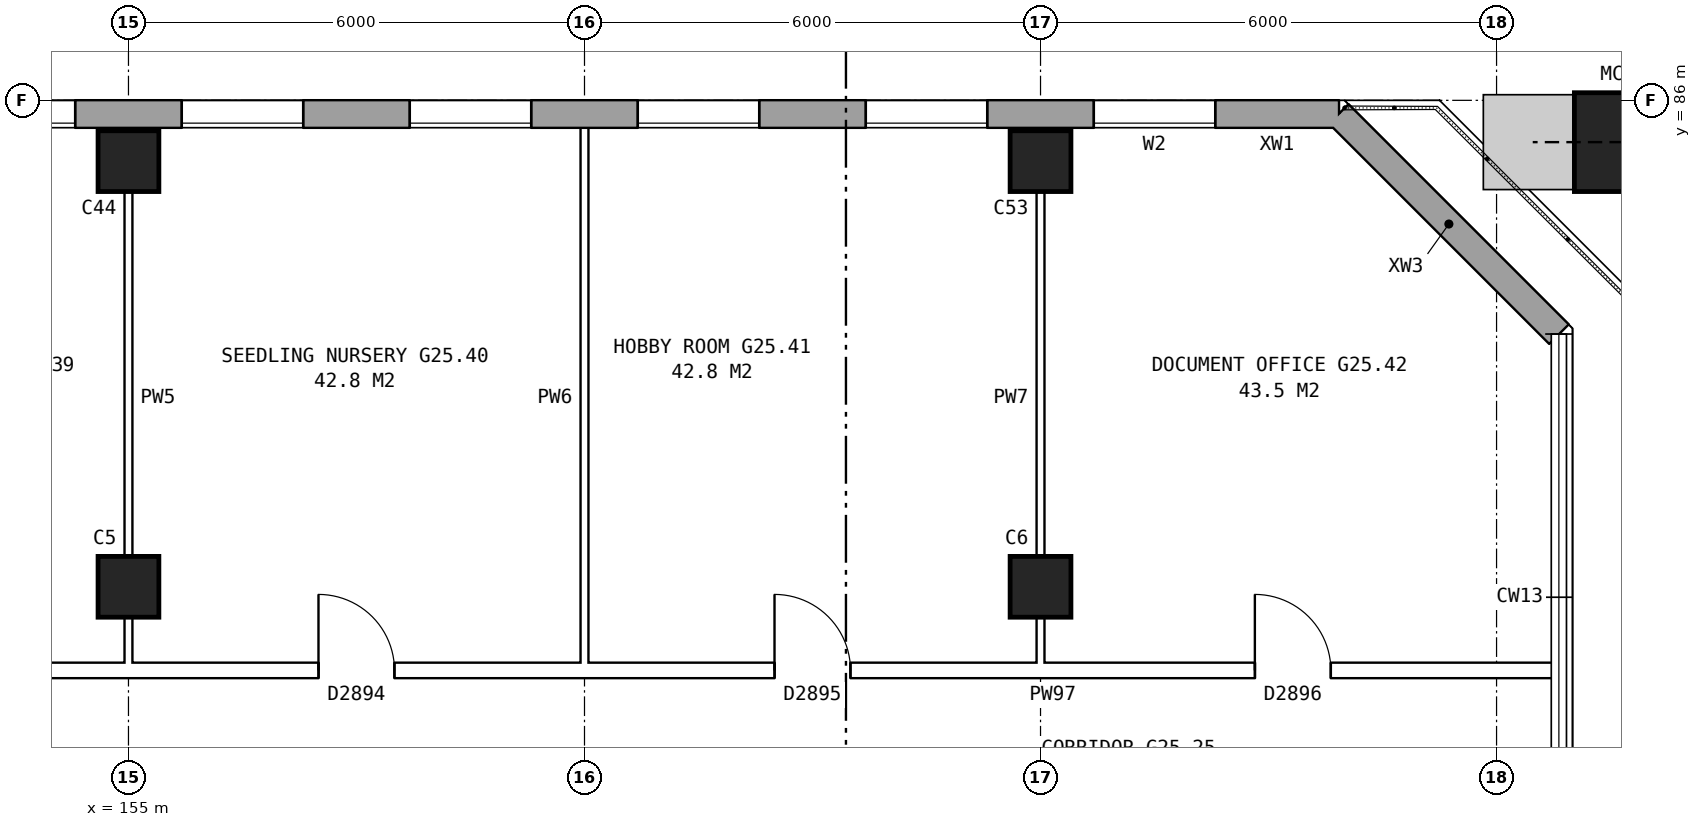
"""IFC4 building model, lengths in metres.
Left out: names, types, materials, properties, quantities, classifications, styles, units other than length and angle.
Written with IfcOpenShell. Run it as: python <this file> out.ifc"""

import sys

from ifc_helpers import new_model, si_unit, direction, frame, frame_2d, origin, origin_2d, place, context, subcontext, project, spatial, rectangle, hollow_rectangle, extrude, element, fill, save


model = new_model("IFC4")
c1 = context("Model", 3, precision=1e-05, world=origin(), true_north=direction((0.0, 1.0)))
c2 = subcontext(c1, "Body", "Model", "MODEL_VIEW")
j1 = project(units=[si_unit("LENGTHUNIT", "METRE"), si_unit("PLANEANGLEUNIT", "RADIAN")], contexts=[c1])
p1 = place(None, origin())
s1 = spatial("IfcSite", under=j1, at=p1, CompositionType="ELEMENT")
p2 = place(p1, origin())
s2 = spatial("IfcBuilding", under=s1, at=p2, CompositionType="ELEMENT")
p3 = place(p2, frame((0.0, 0.0, 90.2)))
s3 = spatial("IfcBuildingStorey", under=s2, at=p3, CompositionType="ELEMENT", Elevation=90.2)
for number, where, z_axis, x_axis in (
    (1, (155.0, 79.6, 0.0), (0.0, 0.0, 1.0), (1.0, 0.0, 0.0)),
    (2, (155.0, 85.2, 0.0), (0.0, 0.0, 1.0), (1.0, 0.0, 0.0)),
    (3, (167.0, 79.6, 0.0), (0.0, 0.0, 1.0), (1.0, 0.0, 0.0)),
    (4, (167.0, 85.2, 0.0), (0.0, 0.0, 1.0), (1.0, 0.0, 0.0)),
):
    element("IfcColumn", number, at=place(p3, frame(where, z_axis=z_axis, x_axis=x_axis)), inside=s3, PredefinedType="COLUMN", context=c2, shape_type="SweptSolid", body=[
        extrude(rectangle(XDim=0.8, YDim=0.8, at=origin_2d()), origin(), (0.0, 0.0, 1.0), 5.6),
    ])
p4 = place(p3, frame((174.674, 85.45, 0.129), z_axis=(-0.197649285048, 0.0, 0.980272798827), x_axis=(0.0, -1.0, 0.0)))
e5 = element("IfcColumn", 5, at=p4, inside=s3, PredefinedType="COLUMN", context=c2, shape_type="SweptSolid", body=[
    extrude(hollow_rectangle(XDim=1.3, YDim=1.3, WallThickness=0.07, at=origin_2d()), origin(), (0.0, 0.0, 1.0), 6.062),
])
p5 = place(p3, frame((173.82, 82.925, 0.0), z_axis=(0.0, 0.0, 1.0), x_axis=(-0.707106781187, 0.707106781187, 0.0)))
e6 = element("IfcWall", 6, at=p5, inside=s3, PredefinedType="STANDARD", context=c2, shape_type="SweptSolid", body=[
    extrude(rectangle(XDim=4.094, YDim=0.36, at=frame_2d((2.047, 0.0))), origin(), (0.0, 0.0, 1.0), 5.6),
])
p6 = place(p3, frame((170.925, 85.82, 0.0), z_axis=(0.0, 0.0, 1.0), x_axis=(-1.0, 0.0, 0.0)))
e7 = element("IfcWall", 7, at=p6, inside=s3, PredefinedType="STANDARD", context=c2, shape_type="SweptSolid", body=[
    extrude(rectangle(XDim=36.851, YDim=0.36, at=frame_2d((18.425, 0.0))), origin(), (0.0, 0.0, 1.0), 5.6),
])
p7 = place(p6, frame((1.625, 0.0, 0.15)))
e8 = element("IfcOpeningElement", 8, at=p7, cuts=e7, PredefinedType="OPENING", context=c2, shape_type="SweptSolid", body=[
    extrude(rectangle(XDim=1.6, YDim=2.4, at=frame_2d((0.8, 1.2))), frame((0.0, 0.19, 0.0), z_axis=(0.0, -1.0, 0.0), x_axis=(1.0, 0.0, 0.0)), (0.0, 0.0, 1.0), 0.38),
])
p8 = place(p6, frame((4.625, 0.0, 0.15)))
e9 = element("IfcOpeningElement", 9, at=p8, cuts=e7, PredefinedType="OPENING", context=c2, shape_type="SweptSolid", body=[
    extrude(rectangle(XDim=1.6, YDim=2.4, at=frame_2d((0.8, 1.2))), frame((0.0, 0.19, 0.0), z_axis=(0.0, -1.0, 0.0), x_axis=(1.0, 0.0, 0.0)), (0.0, 0.0, 1.0), 0.38),
])
p9 = place(p6, frame((7.625, 0.0, 0.15)))
e10 = element("IfcOpeningElement", 10, at=p9, cuts=e7, PredefinedType="OPENING", context=c2, shape_type="SweptSolid", body=[
    extrude(rectangle(XDim=1.6, YDim=2.4, at=frame_2d((0.8, 1.2))), frame((0.0, 0.19, 0.0), z_axis=(0.0, -1.0, 0.0), x_axis=(1.0, 0.0, 0.0)), (0.0, 0.0, 1.0), 0.38),
])
p10 = place(p6, frame((10.625, 0.0, 0.15)))
e11 = element("IfcOpeningElement", 11, at=p10, cuts=e7, PredefinedType="OPENING", context=c2, shape_type="SweptSolid", body=[
    extrude(rectangle(XDim=1.6, YDim=2.4, at=frame_2d((0.8, 1.2))), frame((0.0, 0.19, 0.0), z_axis=(0.0, -1.0, 0.0), x_axis=(1.0, 0.0, 0.0)), (0.0, 0.0, 1.0), 0.38),
])
p11 = place(p6, frame((13.625, 0.0, 0.15)))
e12 = element("IfcOpeningElement", 12, at=p11, cuts=e7, PredefinedType="OPENING", context=c2, shape_type="SweptSolid", body=[
    extrude(rectangle(XDim=1.6, YDim=2.4, at=frame_2d((0.8, 1.2))), frame((0.0, 0.19, 0.0), z_axis=(0.0, -1.0, 0.0), x_axis=(1.0, 0.0, 0.0)), (0.0, 0.0, 1.0), 0.38),
])
p12 = place(p6, frame((16.625, 0.0, 0.15)))
e13 = element("IfcOpeningElement", 13, at=p12, cuts=e7, PredefinedType="OPENING", context=c2, shape_type="SweptSolid", body=[
    extrude(rectangle(XDim=1.6, YDim=2.4, at=frame_2d((0.8, 1.2))), frame((0.0, 0.19, 0.0), z_axis=(0.0, -1.0, 0.0), x_axis=(1.0, 0.0, 0.0)), (0.0, 0.0, 1.0), 0.38),
])
p13 = place(p6, frame((19.625, 0.0, 0.15)))
e14 = element("IfcOpeningElement", 14, at=p13, cuts=e7, PredefinedType="OPENING", context=c2, shape_type="SweptSolid", body=[
    extrude(rectangle(XDim=1.6, YDim=2.4, at=frame_2d((0.8, 1.2))), frame((0.0, 0.19, 0.0), z_axis=(0.0, -1.0, 0.0), x_axis=(1.0, 0.0, 0.0)), (0.0, 0.0, 1.0), 0.38),
])
p14 = place(p6, frame((22.625, 0.0, 0.15)))
e15 = element("IfcOpeningElement", 15, at=p14, cuts=e7, PredefinedType="OPENING", context=c2, shape_type="SweptSolid", body=[
    extrude(rectangle(XDim=1.6, YDim=2.4, at=frame_2d((0.8, 1.2))), frame((0.0, 0.19, 0.0), z_axis=(0.0, -1.0, 0.0), x_axis=(1.0, 0.0, 0.0)), (0.0, 0.0, 1.0), 0.38),
])
p15 = place(p6, frame((25.625, 0.0, 0.15)))
e16 = element("IfcOpeningElement", 16, at=p15, cuts=e7, PredefinedType="OPENING", context=c2, shape_type="SweptSolid", body=[
    extrude(rectangle(XDim=1.6, YDim=2.4, at=frame_2d((0.8, 1.2))), frame((0.0, 0.19, 0.0), z_axis=(0.0, -1.0, 0.0), x_axis=(1.0, 0.0, 0.0)), (0.0, 0.0, 1.0), 0.38),
])
p16 = place(p6, frame((28.625, 0.0, 0.15)))
e17 = element("IfcOpeningElement", 17, at=p16, cuts=e7, PredefinedType="OPENING", context=c2, shape_type="SweptSolid", body=[
    extrude(rectangle(XDim=1.6, YDim=2.4, at=frame_2d((0.8, 1.2))), frame((0.0, 0.19, 0.0), z_axis=(0.0, -1.0, 0.0), x_axis=(1.0, 0.0, 0.0)), (0.0, 0.0, 1.0), 0.38),
])
p17 = place(p6, frame((31.625, 0.0, 0.15)))
e18 = element("IfcOpeningElement", 18, at=p17, cuts=e7, PredefinedType="OPENING", context=c2, shape_type="SweptSolid", body=[
    extrude(rectangle(XDim=1.6, YDim=2.4, at=frame_2d((0.8, 1.2))), frame((0.0, 0.19, 0.0), z_axis=(0.0, -1.0, 0.0), x_axis=(1.0, 0.0, 0.0)), (0.0, 0.0, 1.0), 0.38),
])
p18 = place(p6, frame((34.625, 0.0, 0.15)))
e19 = element("IfcOpeningElement", 19, at=p18, cuts=e7, PredefinedType="OPENING", context=c2, shape_type="SweptSolid", body=[
    extrude(rectangle(XDim=1.6, YDim=2.4, at=frame_2d((0.8, 1.2))), frame((0.0, 0.19, 0.0), z_axis=(0.0, -1.0, 0.0), x_axis=(1.0, 0.0, 0.0)), (0.0, 0.0, 1.0), 0.38),
])
p19 = place(p3, frame((131.24, 78.5, 0.0), z_axis=(0.0, 0.0, 1.0), x_axis=(1.0, 0.0, 0.0)))
e20 = element("IfcWall", 20, at=p19, inside=s3, PredefinedType="PARTITIONING", context=c2, shape_type="SweptSolid", body=[
    extrude(rectangle(XDim=42.52, YDim=0.2, at=frame_2d((21.26, 0.0))), origin(), (0.0, 0.0, 1.0), 5.6),
])
p20 = place(p19, frame((0.99, 0.0, 0.0)))
e21 = element("IfcOpeningElement", 21, at=p20, cuts=e20, PredefinedType="OPENING", context=c2, shape_type="SweptSolid", body=[
    extrude(rectangle(XDim=0.9, YDim=2.1, at=frame_2d((0.45, 1.05))), frame((0.0, 0.11, 0.0), z_axis=(0.0, -1.0, 0.0), x_axis=(1.0, 0.0, 0.0)), (0.0, 0.0, 1.0), 0.22),
])
p21 = place(p19, frame((3.81, 0.0, 0.0)))
e22 = element("IfcOpeningElement", 22, at=p21, cuts=e20, PredefinedType="OPENING", context=c2, shape_type="SweptSolid", body=[
    extrude(rectangle(XDim=0.9, YDim=2.1, at=frame_2d((0.45, 1.05))), frame((0.0, 0.11, 0.0), z_axis=(0.0, -1.0, 0.0), x_axis=(1.0, 0.0, 0.0)), (0.0, 0.0, 1.0), 0.22),
])
p22 = place(p19, frame((6.81, 0.0, 0.0)))
e23 = element("IfcOpeningElement", 23, at=p22, cuts=e20, PredefinedType="OPENING", context=c2, shape_type="SweptSolid", body=[
    extrude(rectangle(XDim=0.9, YDim=2.1, at=frame_2d((0.45, 1.05))), frame((0.0, 0.11, 0.0), z_axis=(0.0, -1.0, 0.0), x_axis=(1.0, 0.0, 0.0)), (0.0, 0.0, 1.0), 0.22),
])
p23 = place(p19, frame((9.81, 0.0, 0.0)))
e24 = element("IfcOpeningElement", 24, at=p23, cuts=e20, PredefinedType="OPENING", context=c2, shape_type="SweptSolid", body=[
    extrude(rectangle(XDim=0.9, YDim=2.1, at=frame_2d((0.45, 1.05))), frame((0.0, 0.11, 0.0), z_axis=(0.0, -1.0, 0.0), x_axis=(1.0, 0.0, 0.0)), (0.0, 0.0, 1.0), 0.22),
])
p24 = place(p19, frame((14.26, 0.0, 0.0)))
e25 = element("IfcOpeningElement", 25, at=p24, cuts=e20, PredefinedType="OPENING", context=c2, shape_type="SweptSolid", body=[
    extrude(rectangle(XDim=1.0, YDim=2.1, at=frame_2d((0.5, 1.05))), frame((0.0, 0.11, 0.0), z_axis=(0.0, -1.0, 0.0), x_axis=(1.0, 0.0, 0.0)), (0.0, 0.0, 1.0), 0.22),
])
p25 = place(p19, frame((20.26, 0.0, 0.0)))
e26 = element("IfcOpeningElement", 26, at=p25, cuts=e20, PredefinedType="OPENING", context=c2, shape_type="SweptSolid", body=[
    extrude(rectangle(XDim=1.0, YDim=2.1, at=frame_2d((0.5, 1.05))), frame((0.0, 0.11, 0.0), z_axis=(0.0, -1.0, 0.0), x_axis=(1.0, 0.0, 0.0)), (0.0, 0.0, 1.0), 0.22),
])
p26 = place(p19, frame((26.26, 0.0, 0.0)))
e27 = element("IfcOpeningElement", 27, at=p26, cuts=e20, PredefinedType="OPENING", context=c2, shape_type="SweptSolid", body=[
    extrude(rectangle(XDim=1.0, YDim=2.1, at=frame_2d((0.5, 1.05))), frame((0.0, 0.11, 0.0), z_axis=(0.0, -1.0, 0.0), x_axis=(1.0, 0.0, 0.0)), (0.0, 0.0, 1.0), 0.22),
])
p27 = place(p19, frame((32.26, 0.0, 0.0)))
e28 = element("IfcOpeningElement", 28, at=p27, cuts=e20, PredefinedType="OPENING", context=c2, shape_type="SweptSolid", body=[
    extrude(rectangle(XDim=1.0, YDim=2.1, at=frame_2d((0.5, 1.05))), frame((0.0, 0.11, 0.0), z_axis=(0.0, -1.0, 0.0), x_axis=(1.0, 0.0, 0.0)), (0.0, 0.0, 1.0), 0.22),
])
p28 = place(p19, frame((38.58, 0.0, 0.0)))
e29 = element("IfcOpeningElement", 29, at=p28, cuts=e20, PredefinedType="OPENING", context=c2, shape_type="SweptSolid", body=[
    extrude(rectangle(XDim=1.0, YDim=2.1, at=frame_2d((0.5, 1.05))), frame((0.0, 0.11, 0.0), z_axis=(0.0, -1.0, 0.0), x_axis=(1.0, 0.0, 0.0)), (0.0, 0.0, 1.0), 0.22),
])
for number, where, z_axis, x_axis in (
    (30, (155.0, 78.4, 0.0), (0.0, 0.0, 1.0), (0.0, 1.0, 0.0)),
    (31, (161.0, 78.4, 0.0), (0.0, 0.0, 1.0), (0.0, 1.0, 0.0)),
    (32, (167.0, 78.4, 0.0), (0.0, 0.0, 1.0), (0.0, 1.0, 0.0)),
):
    element("IfcWall", number, at=place(p3, frame(where, z_axis=z_axis, x_axis=x_axis)), inside=s3, PredefinedType="PARTITIONING", context=c2, shape_type="SweptSolid", body=[
        extrude(rectangle(XDim=7.36, YDim=0.1, at=frame_2d((3.68, 0.0))), origin(), (0.0, 0.0, 1.0), 5.6),
    ])
p29 = place(p7, origin())
e33 = element("IfcWindow", 33, at=p29, inside=s3, PartitioningType="SINGLE_PANEL", PredefinedType="WINDOW", context=c2, shape_type="SweptSolid", body=[
    extrude(rectangle(XDim=1.6, YDim=2.4, at=frame_2d((0.8, 1.2))), frame((0.0, 0.15, 0.0), z_axis=(0.0, -1.0, 0.0), x_axis=(1.0, 0.0, 0.0)), (0.0, 0.0, 1.0), 0.06),
])
fill(e8, e33)
p30 = place(p8, origin())
e34 = element("IfcWindow", 34, at=p30, inside=s3, PartitioningType="SINGLE_PANEL", PredefinedType="WINDOW", context=c2, shape_type="SweptSolid", body=[
    extrude(rectangle(XDim=1.6, YDim=2.4, at=frame_2d((0.8, 1.2))), frame((0.0, 0.15, 0.0), z_axis=(0.0, -1.0, 0.0), x_axis=(1.0, 0.0, 0.0)), (0.0, 0.0, 1.0), 0.06),
])
fill(e9, e34)
p31 = place(p9, origin())
e35 = element("IfcWindow", 35, at=p31, inside=s3, PartitioningType="SINGLE_PANEL", PredefinedType="WINDOW", context=c2, shape_type="SweptSolid", body=[
    extrude(rectangle(XDim=1.6, YDim=2.4, at=frame_2d((0.8, 1.2))), frame((0.0, 0.15, 0.0), z_axis=(0.0, -1.0, 0.0), x_axis=(1.0, 0.0, 0.0)), (0.0, 0.0, 1.0), 0.06),
])
fill(e10, e35)
p32 = place(p10, origin())
e36 = element("IfcWindow", 36, at=p32, inside=s3, PartitioningType="SINGLE_PANEL", PredefinedType="WINDOW", context=c2, shape_type="SweptSolid", body=[
    extrude(rectangle(XDim=1.6, YDim=2.4, at=frame_2d((0.8, 1.2))), frame((0.0, 0.15, 0.0), z_axis=(0.0, -1.0, 0.0), x_axis=(1.0, 0.0, 0.0)), (0.0, 0.0, 1.0), 0.06),
])
fill(e11, e36)
p33 = place(p11, origin())
e37 = element("IfcWindow", 37, at=p33, inside=s3, PartitioningType="SINGLE_PANEL", PredefinedType="WINDOW", context=c2, shape_type="SweptSolid", body=[
    extrude(rectangle(XDim=1.6, YDim=2.4, at=frame_2d((0.8, 1.2))), frame((0.0, 0.15, 0.0), z_axis=(0.0, -1.0, 0.0), x_axis=(1.0, 0.0, 0.0)), (0.0, 0.0, 1.0), 0.06),
])
fill(e12, e37)
p34 = place(p12, origin())
e38 = element("IfcWindow", 38, at=p34, inside=s3, PartitioningType="SINGLE_PANEL", PredefinedType="WINDOW", context=c2, shape_type="SweptSolid", body=[
    extrude(rectangle(XDim=1.6, YDim=2.4, at=frame_2d((0.8, 1.2))), frame((0.0, 0.15, 0.0), z_axis=(0.0, -1.0, 0.0), x_axis=(1.0, 0.0, 0.0)), (0.0, 0.0, 1.0), 0.06),
])
fill(e13, e38)
p35 = place(p26, origin())
e39 = element("IfcDoor", 39, at=p35, inside=s3, OperationType="SINGLE_SWING_LEFT", PredefinedType="DOOR", context=c2, shape_type="SweptSolid", body=[
    extrude(rectangle(XDim=1.0, YDim=2.1, at=frame_2d((0.5, 1.05))), frame((0.0, 0.025, 0.0), z_axis=(0.0, -1.0, 0.0), x_axis=(1.0, 0.0, 0.0)), (0.0, 0.0, 1.0), 0.05),
])
fill(e27, e39)
p36 = place(p27, origin())
e40 = element("IfcDoor", 40, at=p36, inside=s3, OperationType="SINGLE_SWING_LEFT", PredefinedType="DOOR", context=c2, shape_type="SweptSolid", body=[
    extrude(rectangle(XDim=1.0, YDim=2.1, at=frame_2d((0.5, 1.05))), frame((0.0, 0.025, 0.0), z_axis=(0.0, -1.0, 0.0), x_axis=(1.0, 0.0, 0.0)), (0.0, 0.0, 1.0), 0.05),
])
fill(e28, e40)
p37 = place(p28, origin())
e41 = element("IfcDoor", 41, at=p37, inside=s3, OperationType="SINGLE_SWING_LEFT", PredefinedType="DOOR", context=c2, shape_type="SweptSolid", body=[
    extrude(rectangle(XDim=1.0, YDim=2.1, at=frame_2d((0.5, 1.05))), frame((0.0, 0.025, 0.0), z_axis=(0.0, -1.0, 0.0), x_axis=(1.0, 0.0, 0.0)), (0.0, 0.0, 1.0), 0.05),
])
fill(e29, e41)
save(model, sys.argv[1])
